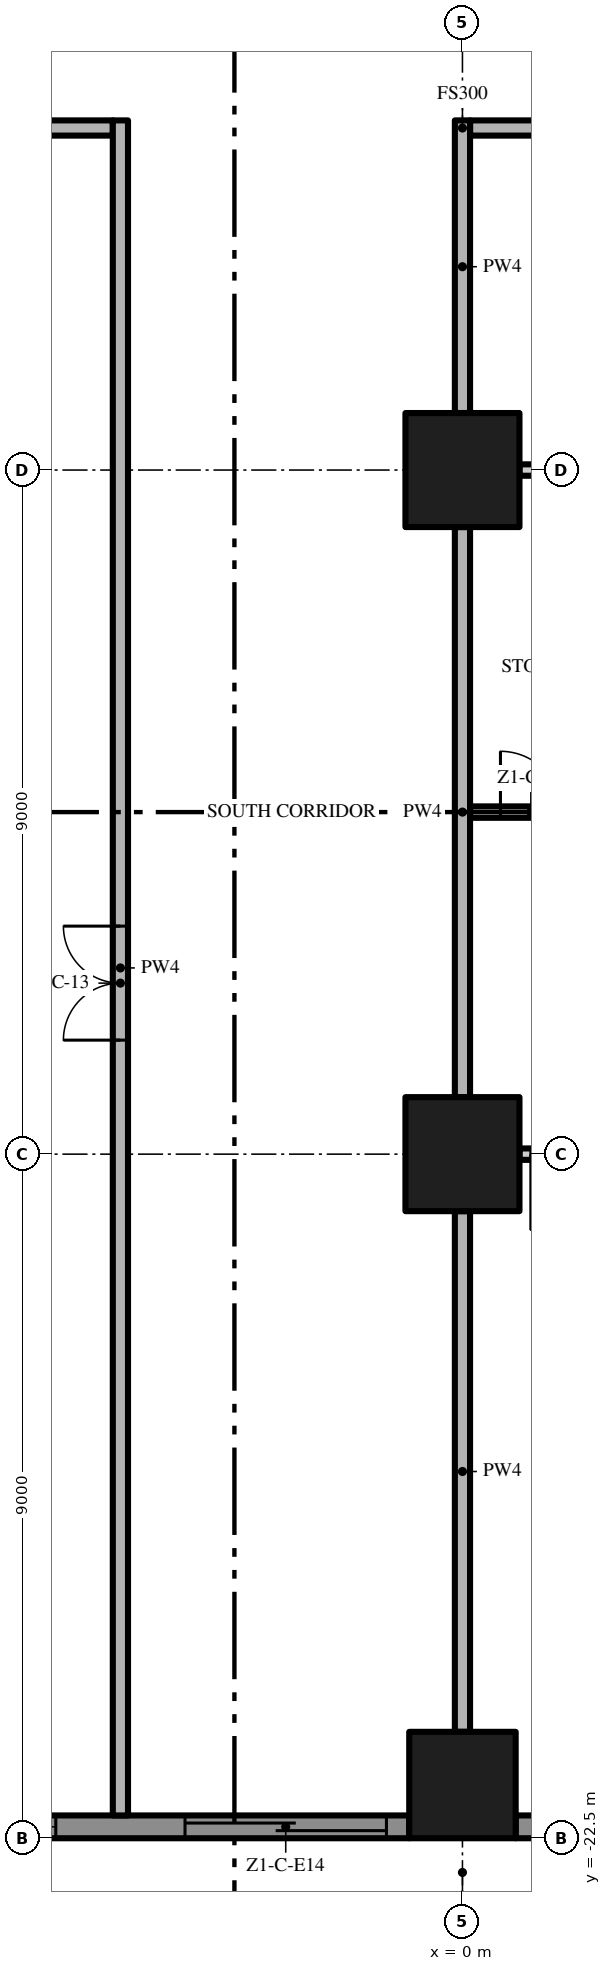
"""IFC4 building model, lengths in metres.
Left out: names, types, materials, properties, quantities, classifications, styles, units other than length and angle.
Written with IfcOpenShell. Run it as: python <this file> out.ifc"""

import sys

from ifc_helpers import new_model, si_unit, direction, frame, frame_2d, origin, origin_2d, place, context, subcontext, project, spatial, polyline, rectangle, outline, extrude, element, fill, save


model = new_model("IFC4")
c1 = context("Model", 3, precision=1e-05, world=origin(), true_north=direction((0.0, 1.0)))
c2 = subcontext(c1, "Body", "Model", "MODEL_VIEW")
j1 = project(units=[si_unit("LENGTHUNIT", "METRE"), si_unit("PLANEANGLEUNIT", "RADIAN")], contexts=[c1])
p1 = place(None, origin())
s1 = spatial("IfcSite", under=j1, at=p1, CompositionType="ELEMENT")
p2 = place(p1, origin())
s2 = spatial("IfcBuilding", under=s1, at=p2, CompositionType="ELEMENT")
p3 = place(p2, frame((0.0, 0.0, 45.4)))
s3 = spatial("IfcBuildingStorey", under=s2, at=p3, CompositionType="ELEMENT", Elevation=45.4)
p4 = place(p3, frame((0.0, -13.5, 0.0), z_axis=(0.0, 0.0, 1.0), x_axis=(1.0, 0.0, 0.0)))
e1 = element("IfcColumn", 1, at=p4, inside=s3, PredefinedType="COLUMN", context=c2, shape_type="SweptSolid", body=[
    extrude(rectangle(XDim=1.5, YDim=1.5, at=origin_2d()), origin(), (0.0, 0.0, 1.0), 3.5),
])
p5 = place(p3, frame((0.0, -21.8, 0.0), z_axis=(0.0, 0.0, 1.0), x_axis=(1.0, 0.0, 0.0)))
e2 = element("IfcColumn", 2, at=p5, inside=s3, PredefinedType="COLUMN", context=c2, shape_type="SweptSolid", body=[
    extrude(rectangle(XDim=1.4, YDim=1.4, at=origin_2d()), origin(), (0.0, 0.0, 1.0), 3.5),
])
p6 = place(p3, frame((0.0, -4.5, 0.0), z_axis=(0.0, 0.0, 1.0), x_axis=(1.0, 0.0, 0.0)))
e3 = element("IfcColumn", 3, at=p6, inside=s3, PredefinedType="COLUMN", context=c2, shape_type="SweptSolid", body=[
    extrude(rectangle(XDim=1.5, YDim=1.5, at=origin_2d()), origin(), (0.0, 0.0, 1.0), 3.5),
])
p7 = place(p3, frame((-0.7, -22.35, 0.0), z_axis=(0.0, 0.0, 1.0), x_axis=(-1.0, 0.0, 0.0)))
e4 = element("IfcWall", 4, at=p7, inside=s3, PredefinedType="SOLIDWALL", context=c2, shape_type="SweptSolid", body=[
    extrude(rectangle(XDim=7.6, YDim=0.3, at=frame_2d((3.8, 0.0))), origin(), (0.0, 0.0, 1.0), 3.5),
])
p8 = place(p7, frame((4.65, 0.0, 0.45)))
e5 = element("IfcOpeningElement", 5, at=p8, cuts=e4, PredefinedType="OPENING", context=c2, shape_type="SweptSolid", body=[
    extrude(rectangle(XDim=2.65, YDim=2.65, at=frame_2d((1.325, 1.325))), frame((0.0, 0.16, 0.0), z_axis=(0.0, -1.0, 0.0), x_axis=(1.0, 0.0, 0.0)), (0.0, 0.0, 1.0), 0.32),
])
p9 = place(p7, frame((0.3, 0.0, 0.0)))
e6 = element("IfcOpeningElement", 6, at=p9, cuts=e4, PredefinedType="OPENING", context=c2, shape_type="SweptSolid", body=[
    extrude(rectangle(XDim=2.65, YDim=2.4, at=frame_2d((1.325, 1.2))), frame((0.0, 0.16, 0.0), z_axis=(0.0, -1.0, 0.0), x_axis=(1.0, 0.0, 0.0)), (0.0, 0.0, 1.0), 0.32),
])
p10 = place(p3, frame((8.3, -22.35, 0.0), z_axis=(0.0, 0.0, 1.0), x_axis=(-1.0, 0.0, 0.0)))
e7 = element("IfcWall", 7, at=p10, inside=s3, PredefinedType="SOLIDWALL", context=c2, shape_type="SweptSolid", body=[
    extrude(rectangle(XDim=7.6, YDim=0.3, at=frame_2d((3.8, 0.0))), origin(), (0.0, 0.0, 1.0), 3.5),
])
p11 = place(p10, frame((4.65, 0.0, 0.45)))
e8 = element("IfcOpeningElement", 8, at=p11, cuts=e7, PredefinedType="OPENING", context=c2, shape_type="SweptSolid", body=[
    extrude(rectangle(XDim=2.65, YDim=2.65, at=frame_2d((1.325, 1.325))), frame((0.0, 0.16, 0.0), z_axis=(0.0, -1.0, 0.0), x_axis=(1.0, 0.0, 0.0)), (0.0, 0.0, 1.0), 0.32),
])
p12 = place(p10, frame((0.3, 0.0, 0.45)))
e9 = element("IfcOpeningElement", 9, at=p12, cuts=e7, PredefinedType="OPENING", context=c2, shape_type="SweptSolid", body=[
    extrude(rectangle(XDim=2.65, YDim=2.65, at=frame_2d((1.325, 1.325))), frame((0.0, 0.16, 0.0), z_axis=(0.0, -1.0, 0.0), x_axis=(1.0, 0.0, 0.0)), (0.0, 0.0, 1.0), 0.32),
])
p13 = place(p3, origin())
e10 = element("IfcWall", 10, at=p13, inside=s3, PredefinedType="USERDEFINED", context=c2, shape_type="SweptSolid", body=[
    extrude(outline(polyline([(-22.5, -24.3), (-21.0, -25.005), (-19.5, -25.441), (-18.75, -25.5), (-18.0, -25.441), (-16.5, -25.005), (-15.0, -24.3), (-13.5, -23.595), (-12.0, -23.159), (-11.25, -23.1), (-10.5, -23.159), (-9.0, -23.595), (-7.5, -24.3), (-6.0, -25.005), (-4.5, -25.441), (-3.75, -25.5), (-3.0, -25.441), (-1.5, -25.005), (0.0, -24.3), (1.5, -23.595), (3.0, -23.159), (3.75, -23.1), (4.5, -23.159), (6.0, -23.595), (7.5, -24.3), (9.0, -25.005), (10.5, -25.441), (11.25, -25.5), (12.0, -25.441), (13.5, -25.005), (15.0, -24.3), (16.5, -23.595), (18.0, -23.159), (18.75, -23.1), (19.5, -23.159), (21.0, -23.595), (22.5, -24.3), (22.606, -24.074), (21.089, -23.36), (19.545, -22.911), (18.75, -22.849), (17.955, -22.911), (16.411, -23.36), (14.894, -24.074), (13.411, -24.771), (11.955, -25.194), (11.25, -25.249), (10.545, -25.194), (9.089, -24.771), (7.606, -24.074), (6.089, -23.36), (4.545, -22.911), (3.75, -22.849), (2.955, -22.911), (1.411, -23.36), (-0.106, -24.074), (-1.589, -24.771), (-3.045, -25.194), (-3.75, -25.249), (-4.455, -25.194), (-5.911, -24.771), (-7.394, -24.074), (-8.911, -23.36), (-10.455, -22.911), (-11.25, -22.849), (-12.045, -22.911), (-13.589, -23.36), (-15.106, -24.074), (-16.589, -24.771), (-18.045, -25.194), (-18.75, -25.249), (-19.455, -25.194), (-20.911, -24.771), (-22.394, -24.074), (-22.5, -24.3)])), origin(), (0.0, 0.0, 1.0), 0.9),
])
p14 = place(p3, frame((8.25, -13.5, 0.0), z_axis=(0.0, 0.0, 1.0), x_axis=(-1.0, 0.0, 0.0)))
e11 = element("IfcWall", 11, at=p14, inside=s3, PredefinedType="PARTITIONING", context=c2, shape_type="SweptSolid", body=[
    extrude(rectangle(XDim=7.5, YDim=0.15, at=frame_2d((3.75, 0.0))), origin(), (0.0, 0.0, 1.0), 3.5),
])
p15 = place(p14, frame((6.35, 0.0, 0.0)))
e12 = element("IfcOpeningElement", 12, at=p15, cuts=e11, PredefinedType="OPENING", context=c2, shape_type="SweptSolid", body=[
    extrude(rectangle(XDim=1.0, YDim=2.4, at=frame_2d((0.5, 1.2))), frame((0.0, 0.085, 0.0), z_axis=(0.0, -1.0, 0.0), x_axis=(1.0, 0.0, 0.0)), (0.0, 0.0, 1.0), 0.17),
])
p16 = place(p14, frame((0.15, 0.0, 0.0)))
e13 = element("IfcOpeningElement", 13, at=p16, cuts=e11, PredefinedType="OPENING", context=c2, shape_type="SweptSolid", body=[
    extrude(rectangle(XDim=1.0, YDim=2.4, at=frame_2d((0.5, 1.2))), frame((0.0, 0.085, 0.0), z_axis=(0.0, -1.0, 0.0), x_axis=(1.0, 0.0, 0.0)), (0.0, 0.0, 1.0), 0.17),
])
p17 = place(p3, frame((0.1, -9.0, 0.0), z_axis=(0.0, 0.0, 1.0), x_axis=(1.0, 0.0, 0.0)))
e14 = element("IfcWall", 14, at=p17, inside=s3, PredefinedType="PARTITIONING", context=c2, shape_type="SweptSolid", body=[
    extrude(rectangle(XDim=13.4, YDim=0.15, at=frame_2d((6.7, 0.0))), origin(), (0.0, 0.0, 1.0), 3.5),
])
p18 = place(p17, frame((0.4, 0.0, 0.0)))
e15 = element("IfcOpeningElement", 15, at=p18, cuts=e14, PredefinedType="OPENING", context=c2, shape_type="SweptSolid", body=[
    extrude(rectangle(XDim=0.8, YDim=2.0, at=frame_2d((0.4, 1.0))), frame((0.0, 0.085, 0.0), z_axis=(0.0, -1.0, 0.0), x_axis=(1.0, 0.0, 0.0)), (0.0, 0.0, 1.0), 0.17),
])
p19 = place(p17, frame((6.9, 0.0, 0.0)))
e16 = element("IfcOpeningElement", 16, at=p19, cuts=e14, PredefinedType="OPENING", context=c2, shape_type="SweptSolid", body=[
    extrude(rectangle(XDim=1.0, YDim=2.4, at=frame_2d((0.5, 1.2))), frame((0.0, 0.085, 0.0), z_axis=(0.0, -1.0, 0.0), x_axis=(1.0, 0.0, 0.0)), (0.0, 0.0, 1.0), 0.17),
])
p20 = place(p3, frame((8.25, -4.5, 0.0), z_axis=(0.0, 0.0, 1.0), x_axis=(-1.0, 0.0, 0.0)))
e17 = element("IfcWall", 17, at=p20, inside=s3, PredefinedType="PARTITIONING", context=c2, shape_type="SweptSolid", body=[
    extrude(rectangle(XDim=7.5, YDim=0.15, at=frame_2d((3.75, 0.0))), origin(), (0.0, 0.0, 1.0), 3.5),
])
p21 = place(p20, frame((4.7, 0.0, 0.0)))
e18 = element("IfcOpeningElement", 18, at=p21, cuts=e17, PredefinedType="OPENING", context=c2, shape_type="SweptSolid", body=[
    extrude(rectangle(XDim=0.8, YDim=2.0, at=frame_2d((0.4, 1.0))), frame((0.0, 0.085, 0.0), z_axis=(0.0, -1.0, 0.0), x_axis=(1.0, 0.0, 0.0)), (0.0, 0.0, 1.0), 0.17),
])
p22 = place(p3, frame((-17.4, 0.0, 0.0), z_axis=(0.0, 0.0, 1.0), x_axis=(1.0, 0.0, 0.0)))
e19 = element("IfcWall", 19, at=p22, inside=s3, PredefinedType="PARTITIONING", context=c2, shape_type="SweptSolid", body=[
    extrude(rectangle(XDim=12.8, YDim=0.2, at=frame_2d((6.4, 0.0))), origin(), (0.0, 0.0, 1.0), 3.5),
])
p23 = place(p3, frame((17.4, 0.0, 0.0), z_axis=(0.0, 0.0, 1.0), x_axis=(-1.0, 0.0, 0.0)))
e20 = element("IfcWall", 20, at=p23, inside=s3, PredefinedType="PARTITIONING", context=c2, shape_type="SweptSolid", body=[
    extrude(rectangle(XDim=17.3, YDim=0.2, at=frame_2d((8.65, 0.0))), origin(), (0.0, 0.0, 1.0), 3.5),
])
p24 = place(p23, frame((7.65, 0.0, 0.0)))
e21 = element("IfcOpeningElement", 21, at=p24, cuts=e20, PredefinedType="OPENING", context=c2, shape_type="SweptSolid", body=[
    extrude(rectangle(XDim=1.5, YDim=2.4, at=frame_2d((0.75, 1.2))), frame((0.0, 0.11, 0.0), z_axis=(0.0, -1.0, 0.0), x_axis=(1.0, 0.0, 0.0)), (0.0, 0.0, 1.0), 0.22),
])
p25 = place(p3, frame((-4.5, -22.2, 0.0), z_axis=(0.0, 0.0, 1.0), x_axis=(0.0, 1.0, 0.0)))
e22 = element("IfcWall", 22, at=p25, inside=s3, PredefinedType="PARTITIONING", context=c2, shape_type="SweptSolid", body=[
    extrude(rectangle(XDim=22.3, YDim=0.2, at=frame_2d((11.15, 0.0))), origin(), (0.0, 0.0, 1.0), 3.5),
])
p26 = place(p25, frame((10.2, 0.0, 0.0)))
e23 = element("IfcOpeningElement", 23, at=p26, cuts=e22, PredefinedType="OPENING", context=c2, shape_type="SweptSolid", body=[
    extrude(rectangle(XDim=1.5, YDim=2.4, at=frame_2d((0.75, 1.2))), frame((0.0, 0.11, 0.0), z_axis=(0.0, -1.0, 0.0), x_axis=(1.0, 0.0, 0.0)), (0.0, 0.0, 1.0), 0.22),
])
p27 = place(p3, frame((0.0, -21.1, 0.0), z_axis=(0.0, 0.0, 1.0), x_axis=(0.0, 1.0, 0.0)))
e24 = element("IfcWall", 24, at=p27, inside=s3, PredefinedType="PARTITIONING", context=c2, shape_type="SweptSolid", body=[
    extrude(rectangle(XDim=6.85, YDim=0.2, at=frame_2d((3.425, 0.0))), origin(), (0.0, 0.0, 1.0), 3.5),
])
p28 = place(p3, frame((0.0, -12.75, 0.0), z_axis=(0.0, 0.0, 1.0), x_axis=(0.0, 1.0, 0.0)))
e25 = element("IfcWall", 25, at=p28, inside=s3, PredefinedType="PARTITIONING", context=c2, shape_type="SweptSolid", body=[
    extrude(rectangle(XDim=7.5, YDim=0.2, at=frame_2d((3.75, 0.0))), origin(), (0.0, 0.0, 1.0), 3.5),
])
p29 = place(p3, frame((0.0, -3.75, 0.0), z_axis=(0.0, 0.0, 1.0), x_axis=(0.0, 1.0, 0.0)))
e26 = element("IfcWall", 26, at=p29, inside=s3, PredefinedType="PARTITIONING", context=c2, shape_type="SweptSolid", body=[
    extrude(rectangle(XDim=3.85, YDim=0.2, at=frame_2d((1.925, 0.0))), origin(), (0.0, 0.0, 1.0), 3.5),
])
p30 = place(p8, origin())
e27 = element("IfcWindow", 27, at=p30, inside=s3, PartitioningType="SINGLE_PANEL", PredefinedType="WINDOW", context=c2, shape_type="SweptSolid", body=[
    extrude(rectangle(XDim=2.65, YDim=2.65, at=frame_2d((1.325, 1.325))), frame((0.0, 0.03, 0.0), z_axis=(0.0, -1.0, 0.0), x_axis=(1.0, 0.0, 0.0)), (0.0, 0.0, 1.0), 0.06),
])
fill(e5, e27)
p31 = place(p9, origin())
e28 = element("IfcDoor", 28, at=p31, inside=s3, OperationType="SINGLE_SWING_LEFT", PredefinedType="DOOR", context=c2, shape_type="SweptSolid", body=[
    extrude(rectangle(XDim=2.65, YDim=2.4, at=frame_2d((1.325, 1.2))), frame((0.0, 0.025, 0.0), z_axis=(0.0, -1.0, 0.0), x_axis=(1.0, 0.0, 0.0)), (0.0, 0.0, 1.0), 0.05),
])
fill(e6, e28)
p32 = place(p26, origin())
e29 = element("IfcDoor", 29, at=p32, inside=s3, OperationType="DOUBLE_DOOR_SINGLE_SWING", PredefinedType="DOOR", context=c2, shape_type="SweptSolid", body=[
    extrude(rectangle(XDim=1.5, YDim=2.4, at=frame_2d((0.75, 1.2))), frame((0.0, 0.025, 0.0), z_axis=(0.0, -1.0, 0.0), x_axis=(1.0, 0.0, 0.0)), (0.0, 0.0, 1.0), 0.05),
])
fill(e23, e29)
p33 = place(p18, origin())
e30 = element("IfcDoor", 30, at=p33, inside=s3, OperationType="SINGLE_SWING_LEFT", PredefinedType="DOOR", context=c2, shape_type="SweptSolid", body=[
    extrude(rectangle(XDim=0.8, YDim=2.0, at=frame_2d((0.4, 1.0))), frame((0.0, 0.025, 0.0), z_axis=(0.0, -1.0, 0.0), x_axis=(1.0, 0.0, 0.0)), (0.0, 0.0, 1.0), 0.05),
])
fill(e15, e30)
save(model, sys.argv[1])
